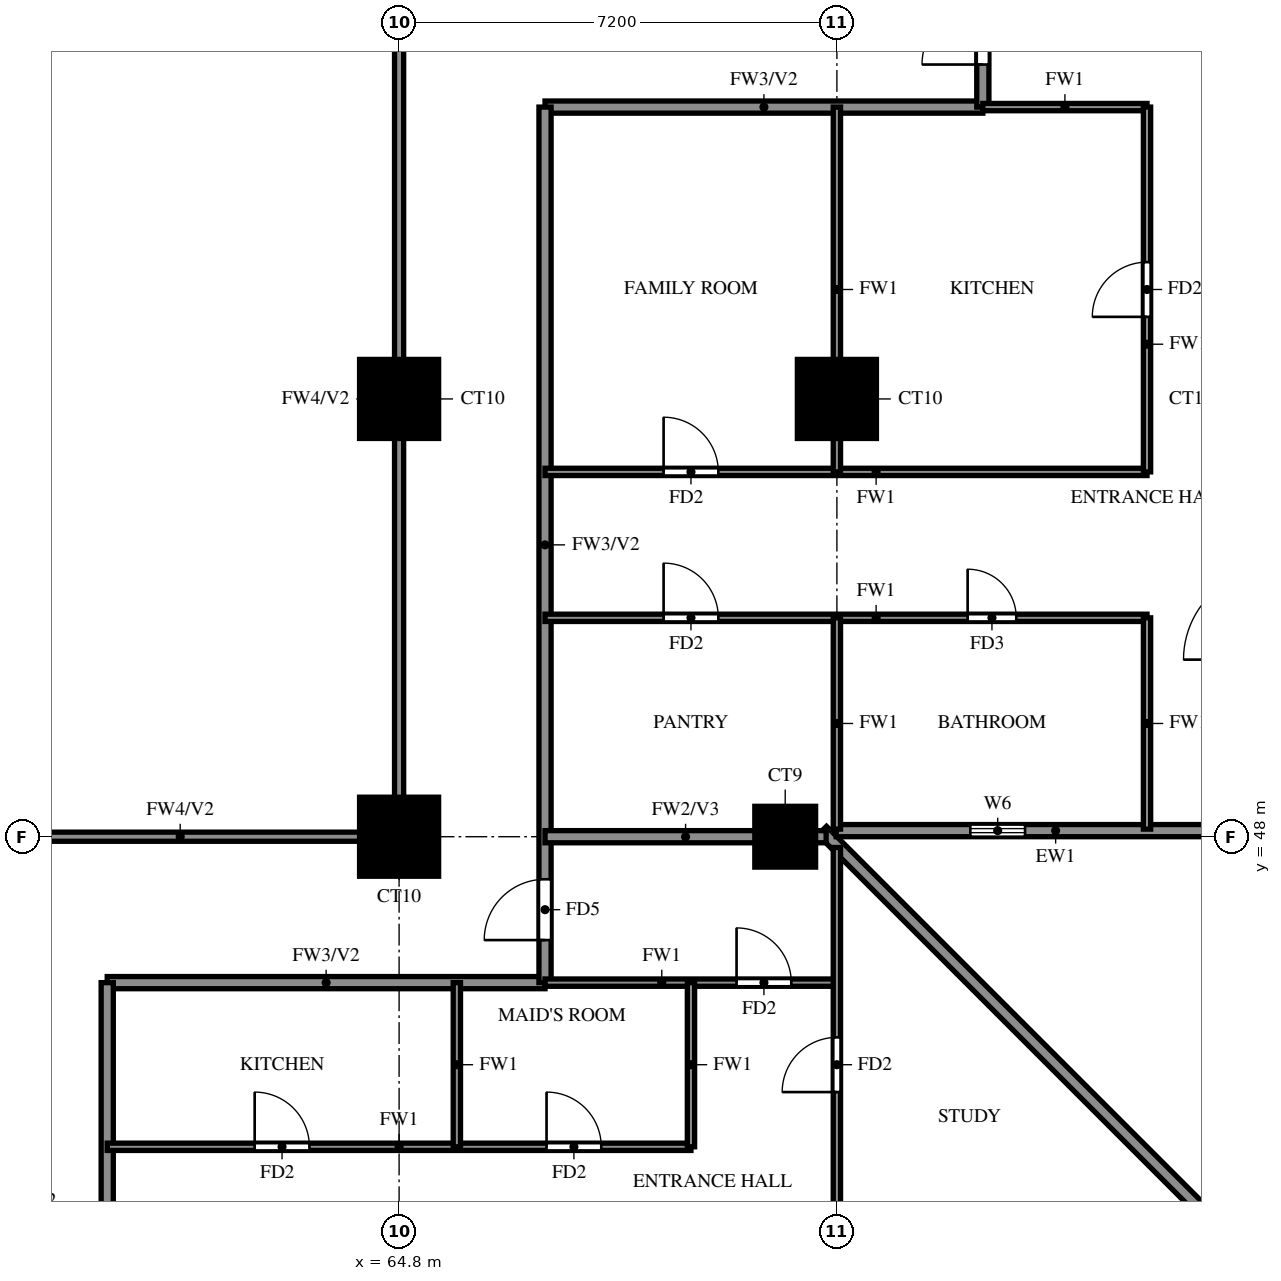
"""IFC4 building model, lengths in metres.
Left out: names, types, materials, properties, quantities, classifications, styles, units other than length and angle.
Written with IfcOpenShell. Run it as: python <this file> out.ifc"""

import sys

from ifc_helpers import new_model, si_unit, direction, frame, frame_2d, origin, origin_2d, place, context, subcontext, project, spatial, rectangle, extrude, source, transform, mapped, element, fill, save


model = new_model("IFC4")
c1 = context("Model", 3, precision=1e-05, world=origin(), true_north=direction((0.0, 1.0)))
c2 = subcontext(c1, "Body", "Model", "MODEL_VIEW")
j1 = project(units=[si_unit("LENGTHUNIT", "METRE"), si_unit("PLANEANGLEUNIT", "RADIAN")], contexts=[c1])
p1 = place(None, origin())
s1 = spatial("IfcSite", under=j1, at=p1, CompositionType="ELEMENT")
p2 = place(p1, origin())
s2 = spatial("IfcBuilding", under=s1, at=p2, CompositionType="ELEMENT")
p3 = place(p2, frame((0.0, 0.0, 72.5)))
s3 = spatial("IfcBuildingStorey", under=s2, at=p3, CompositionType="ELEMENT", Elevation=72.5)
m1 = source(origin(), c2, "Body", "SweptSolid", [
    extrude(rectangle(XDim=1.3, YDim=1.3, at=origin_2d()), origin(), (0.0, 0.0, 1.0), 3.18),
])
p4 = place(p3, frame((64.8, 48.0, 0.0), z_axis=(0.0, 0.0, 1.0), x_axis=(1.0, 0.0, 0.0)))
e1 = element("IfcColumn", 1, at=p4, inside=s3, PredefinedType="COLUMN", context=c2, shape_type="MappedRepresentation", body=[
    mapped(m1, transform((0.0, 0.0, 0.0))),
])
m2 = source(origin(), c2, "Body", "SweptSolid", [
    extrude(rectangle(XDim=1.0, YDim=1.0, at=origin_2d()), origin(), (0.0, 0.0, 1.0), 3.18),
])
p5 = place(p3, frame((71.15, 48.0, 0.0), z_axis=(0.0, 0.0, 1.0), x_axis=(1.0, 0.0, 0.0)))
e2 = element("IfcColumn", 2, at=p5, inside=s3, PredefinedType="COLUMN", context=c2, shape_type="MappedRepresentation", body=[
    mapped(m2, transform((0.0, 0.0, 0.0))),
])
for number, where, z_axis, x_axis in (
    (3, (64.8, 55.2, 0.0), (0.0, 0.0, 1.0), (1.0, 0.0, 0.0)),
    (4, (72.0, 55.2, 0.0), (0.0, 0.0, 1.0), (1.0, 0.0, 0.0)),
):
    element("IfcColumn", number, at=place(p3, frame(where, z_axis=z_axis, x_axis=x_axis)), inside=s3, PredefinedType="COLUMN", context=c2, shape_type="MappedRepresentation", body=[
        mapped(m1, transform((0.0, 0.0, 0.0))),
    ])
p6 = place(p3, frame((85.996, 33.863, 0.0), z_axis=(0.0, 0.0, 1.0), x_axis=(-0.707100718496, 0.707112843825, 0.0)))
e5 = element("IfcWall", 5, at=p6, inside=s3, PredefinedType="SOLIDWALL", context=c2, shape_type="SweptSolid", body=[
    extrude(rectangle(XDim=20.135, YDim=0.2, at=frame_2d((10.067, 0.0))), origin(), (0.0, 0.0, 1.0), 3.18),
])
p7 = place(p3, frame((71.989, 48.1, 0.0), z_axis=(0.0, 0.0, 1.0), x_axis=(1.0, 0.0, 0.0)))
e6 = element("IfcWall", 6, at=p7, inside=s3, PredefinedType="SOLIDWALL", context=c2, shape_type="SweptSolid", body=[
    extrude(rectangle(XDim=6.562, YDim=0.2, at=frame_2d((3.281, 0.0))), origin(), (0.0, 0.0, 1.0), 3.18),
])
p8 = place(p7, frame((2.206, 0.0, 1.5)))
e7 = element("IfcOpeningElement", 7, at=p8, cuts=e6, PredefinedType="OPENING", context=c2, shape_type="SweptSolid", body=[
    extrude(rectangle(XDim=0.9, YDim=0.9, at=frame_2d((0.45, 0.45))), frame((0.0, 0.11, 0.0), z_axis=(0.0, -1.0, 0.0), x_axis=(1.0, 0.0, 0.0)), (0.0, 0.0, 1.0), 0.22),
])
for number, where, z_axis, x_axis in (
    (8, (60.0, 45.6, 0.0), (0.0, 0.0, 1.0), (1.0, 0.0, 0.0)),
    (9, (67.2, 60.0, 0.0), (0.0, 0.0, 1.0), (1.0, 0.0, 0.0)),
):
    element("IfcWall", number, at=place(p3, frame(where, z_axis=z_axis, x_axis=x_axis)), inside=s3, PredefinedType="SOLIDWALL", context=c2, shape_type="SweptSolid", body=[
        extrude(rectangle(XDim=7.2, YDim=0.2, at=frame_2d((3.6, 0.0))), origin(), (0.0, 0.0, 1.0), 3.18),
    ])
p9 = place(p3, frame((60.0, 33.725, 0.0), z_axis=(0.0, 0.0, 1.0), x_axis=(0.0, 1.0, 0.0)))
e10 = element("IfcWall", 10, at=p9, inside=s3, PredefinedType="SOLIDWALL", context=c2, shape_type="SweptSolid", body=[
    extrude(rectangle(XDim=11.875, YDim=0.2, at=frame_2d((5.938, 0.0))), origin(), (0.0, 0.0, 1.0), 2.28),
])
p10 = place(p3, frame((67.2, 45.6, 0.0), z_axis=(0.0, 0.0, 1.0), x_axis=(0.0, 1.0, 0.0)))
e11 = element("IfcWall", 11, at=p10, inside=s3, PredefinedType="SOLIDWALL", context=c2, shape_type="SweptSolid", body=[
    extrude(rectangle(XDim=14.4, YDim=0.2, at=frame_2d((7.2, 0.0))), origin(), (0.0, 0.0, 1.0), 3.18),
])
p11 = place(p10, frame((0.7, 0.0, 0.0)))
e12 = element("IfcOpeningElement", 12, at=p11, cuts=e11, PredefinedType="OPENING", context=c2, shape_type="SweptSolid", body=[
    extrude(rectangle(XDim=1.0, YDim=2.1, at=frame_2d((0.5, 1.05))), frame((0.0, 0.11, 0.0), z_axis=(0.0, -1.0, 0.0), x_axis=(1.0, 0.0, 0.0)), (0.0, 0.0, 1.0), 0.22),
])
p12 = place(p3, frame((74.4, 60.0, 0.0), z_axis=(0.0, 0.0, 1.0), x_axis=(0.0, 1.0, 0.0)))
e13 = element("IfcWall", 13, at=p12, inside=s3, PredefinedType="SOLIDWALL", context=c2, shape_type="SweptSolid", body=[
    extrude(rectangle(XDim=9.45, YDim=0.2, at=frame_2d((4.725, 0.0))), origin(), (0.0, 0.0, 1.0), 3.18),
])
p13 = place(p12, frame((0.7, 0.0, 0.0)))
e14 = element("IfcOpeningElement", 14, at=p13, cuts=e13, PredefinedType="OPENING", context=c2, shape_type="SweptSolid", body=[
    extrude(rectangle(XDim=1.0, YDim=2.1, at=frame_2d((0.5, 1.05))), frame((0.0, 0.11, 0.0), z_axis=(0.0, -1.0, 0.0), x_axis=(1.0, 0.0, 0.0)), (0.0, 0.0, 1.0), 0.22),
])
p14 = place(p12, frame((3.1, 0.0, 0.0)))
e15 = element("IfcOpeningElement", 15, at=p14, cuts=e13, PredefinedType="OPENING", context=c2, shape_type="SweptSolid", body=[
    extrude(rectangle(XDim=1.0, YDim=2.1, at=frame_2d((0.5, 1.05))), frame((0.0, 0.11, 0.0), z_axis=(0.0, -1.0, 0.0), x_axis=(1.0, 0.0, 0.0)), (0.0, 0.0, 1.0), 0.22),
])
p15 = place(p3, frame((67.2, 48.0, 0.0), z_axis=(0.0, 0.0, 1.0), x_axis=(1.0, 0.0, 0.0)))
e16 = element("IfcWall", 16, at=p15, inside=s3, PredefinedType="SOLIDWALL", context=c2, shape_type="SweptSolid", body=[
    extrude(rectangle(XDim=4.623, YDim=0.2, at=frame_2d((2.312, 0.0))), origin(), (0.0, 0.0, 1.0), 3.18),
])
p16 = place(p3, frame((60.0, 42.9, 0.0), z_axis=(0.0, 0.0, 1.0), x_axis=(1.0, 0.0, 0.0)))
e17 = element("IfcWall", 17, at=p16, inside=s3, PredefinedType="PARTITIONING", context=c2, shape_type="SweptSolid", body=[
    extrude(rectangle(XDim=9.6, YDim=0.12, at=frame_2d((4.8, 0.0))), origin(), (0.0, 0.0, 1.0), 3.18),
])
p17 = place(p16, frame((7.225, 0.0, 0.0)))
e18 = element("IfcOpeningElement", 18, at=p17, cuts=e17, PredefinedType="OPENING", context=c2, shape_type="SweptSolid", body=[
    extrude(rectangle(XDim=0.9, YDim=2.1, at=frame_2d((0.45, 1.05))), frame((0.0, 0.07, 0.0), z_axis=(0.0, -1.0, 0.0), x_axis=(1.0, 0.0, 0.0)), (0.0, 0.0, 1.0), 0.14),
])
p18 = place(p16, frame((2.425, 0.0, 0.0)))
e19 = element("IfcOpeningElement", 19, at=p18, cuts=e17, PredefinedType="OPENING", context=c2, shape_type="SweptSolid", body=[
    extrude(rectangle(XDim=0.9, YDim=2.1, at=frame_2d((0.45, 1.05))), frame((0.0, 0.07, 0.0), z_axis=(0.0, -1.0, 0.0), x_axis=(1.0, 0.0, 0.0)), (0.0, 0.0, 1.0), 0.14),
])
p19 = place(p3, frame((67.2, 45.6, 0.0), z_axis=(0.0, 0.0, 1.0), x_axis=(1.0, 0.0, 0.0)))
e20 = element("IfcWall", 20, at=p19, inside=s3, PredefinedType="PARTITIONING", context=c2, shape_type="SweptSolid", body=[
    extrude(rectangle(XDim=4.8, YDim=0.12, at=frame_2d((2.4, 0.0))), origin(), (0.0, 0.0, 1.0), 3.18),
])
p20 = place(p19, frame((3.15, 0.0, 0.0)))
e21 = element("IfcOpeningElement", 21, at=p20, cuts=e20, PredefinedType="OPENING", context=c2, shape_type="SweptSolid", body=[
    extrude(rectangle(XDim=0.9, YDim=2.1, at=frame_2d((0.45, 1.05))), frame((0.0, 0.07, 0.0), z_axis=(0.0, -1.0, 0.0), x_axis=(1.0, 0.0, 0.0)), (0.0, 0.0, 1.0), 0.14),
])
p21 = place(p3, frame((67.2, 51.6, 0.0), z_axis=(0.0, 0.0, 1.0), x_axis=(1.0, 0.0, 0.0)))
e22 = element("IfcWall", 22, at=p21, inside=s3, PredefinedType="PARTITIONING", context=c2, shape_type="SweptSolid", body=[
    extrude(rectangle(XDim=9.9, YDim=0.12, at=frame_2d((4.95, 0.0))), origin(), (0.0, 0.0, 1.0), 3.18),
])
p22 = place(p21, frame((6.95, 0.0, 0.0)))
e23 = element("IfcOpeningElement", 23, at=p22, cuts=e22, PredefinedType="OPENING", context=c2, shape_type="SweptSolid", body=[
    extrude(rectangle(XDim=0.8, YDim=2.1, at=frame_2d((0.4, 1.05))), frame((0.0, 0.07, 0.0), z_axis=(0.0, -1.0, 0.0), x_axis=(1.0, 0.0, 0.0)), (0.0, 0.0, 1.0), 0.14),
])
p23 = place(p21, frame((1.95, 0.0, 0.0)))
e24 = element("IfcOpeningElement", 24, at=p23, cuts=e22, PredefinedType="OPENING", context=c2, shape_type="SweptSolid", body=[
    extrude(rectangle(XDim=0.9, YDim=2.1, at=frame_2d((0.45, 1.05))), frame((0.0, 0.07, 0.0), z_axis=(0.0, -1.0, 0.0), x_axis=(1.0, 0.0, 0.0)), (0.0, 0.0, 1.0), 0.14),
])
p24 = place(p3, frame((67.2, 54.0, 0.0), z_axis=(0.0, 0.0, 1.0), x_axis=(1.0, 0.0, 0.0)))
e25 = element("IfcWall", 25, at=p24, inside=s3, PredefinedType="PARTITIONING", context=c2, shape_type="SweptSolid", body=[
    extrude(rectangle(XDim=9.9, YDim=0.12, at=frame_2d((4.95, 0.0))), origin(), (0.0, 0.0, 1.0), 3.18),
])
p25 = place(p24, frame((1.95, 0.0, 0.0)))
e26 = element("IfcOpeningElement", 26, at=p25, cuts=e25, PredefinedType="OPENING", context=c2, shape_type="SweptSolid", body=[
    extrude(rectangle(XDim=0.9, YDim=2.1, at=frame_2d((0.45, 1.05))), frame((0.0, 0.07, 0.0), z_axis=(0.0, -1.0, 0.0), x_axis=(1.0, 0.0, 0.0)), (0.0, 0.0, 1.0), 0.14),
])
for number, where, z_axis, x_axis in (
    (27, (74.4, 60.0, 0.0), (0.0, 0.0, 1.0), (1.0, 0.0, 0.0)),
    (28, (65.75, 42.9, 0.0), (0.0, 0.0, 1.0), (0.0, 1.0, 0.0)),
    (29, (69.6, 42.9, 0.0), (0.0, 0.0, 1.0), (0.0, 1.0, 0.0)),
):
    element("IfcWall", number, at=place(p3, frame(where, z_axis=z_axis, x_axis=x_axis)), inside=s3, PredefinedType="PARTITIONING", context=c2, shape_type="SweptSolid", body=[
        extrude(rectangle(XDim=2.7, YDim=0.12, at=frame_2d((1.35, 0.0))), origin(), (0.0, 0.0, 1.0), 3.18),
    ])
p26 = place(p3, frame((72.0, 33.725, 0.0), z_axis=(0.0, 0.0, 1.0), x_axis=(0.0, 1.0, 0.0)))
e30 = element("IfcWall", 30, at=p26, inside=s3, PredefinedType="PARTITIONING", context=c2, shape_type="SweptSolid", body=[
    extrude(rectangle(XDim=14.098, YDim=0.12, at=frame_2d((7.049, 0.0))), origin(), (0.0, 0.0, 1.0), 2.28),
])
p27 = place(p26, frame((10.075, 0.0, 0.0)))
e31 = element("IfcOpeningElement", 31, at=p27, cuts=e30, PredefinedType="OPENING", context=c2, shape_type="SweptSolid", body=[
    extrude(rectangle(XDim=0.9, YDim=2.1, at=frame_2d((0.45, 1.05))), frame((0.0, 0.07, 0.0), z_axis=(0.0, -1.0, 0.0), x_axis=(1.0, 0.0, 0.0)), (0.0, 0.0, 1.0), 0.14),
])
p28 = place(p3, frame((72.0, 48.125, 0.0), z_axis=(0.0, 0.0, 1.0), x_axis=(0.0, 1.0, 0.0)))
e32 = element("IfcWall", 32, at=p28, inside=s3, PredefinedType="PARTITIONING", context=c2, shape_type="SweptSolid", body=[
    extrude(rectangle(XDim=3.475, YDim=0.12, at=frame_2d((1.738, 0.0))), origin(), (0.0, 0.0, 1.0), 3.18),
])
p29 = place(p3, frame((72.0, 54.0, 0.0), z_axis=(0.0, 0.0, 1.0), x_axis=(0.0, 1.0, 0.0)))
e33 = element("IfcWall", 33, at=p29, inside=s3, PredefinedType="PARTITIONING", context=c2, shape_type="SweptSolid", body=[
    extrude(rectangle(XDim=6.0, YDim=0.12, at=frame_2d((3.0, 0.0))), origin(), (0.0, 0.0, 1.0), 3.18),
])
p30 = place(p3, frame((77.1, 48.125, 0.0), z_axis=(0.0, 0.0, 1.0), x_axis=(0.0, 1.0, 0.0)))
e34 = element("IfcWall", 34, at=p30, inside=s3, PredefinedType="PARTITIONING", context=c2, shape_type="SweptSolid", body=[
    extrude(rectangle(XDim=3.475, YDim=0.12, at=frame_2d((1.738, 0.0))), origin(), (0.0, 0.0, 1.0), 3.18),
])
p31 = place(p3, frame((77.1, 54.0, 0.0), z_axis=(0.0, 0.0, 1.0), x_axis=(0.0, 1.0, 0.0)))
e35 = element("IfcWall", 35, at=p31, inside=s3, PredefinedType="PARTITIONING", context=c2, shape_type="SweptSolid", body=[
    extrude(rectangle(XDim=6.0, YDim=0.12, at=frame_2d((3.0, 0.0))), origin(), (0.0, 0.0, 1.0), 3.18),
])
p32 = place(p31, frame((2.55, 0.0, 0.0)))
e36 = element("IfcOpeningElement", 36, at=p32, cuts=e35, PredefinedType="OPENING", context=c2, shape_type="SweptSolid", body=[
    extrude(rectangle(XDim=0.9, YDim=2.1, at=frame_2d((0.45, 1.05))), frame((0.0, 0.07, 0.0), z_axis=(0.0, -1.0, 0.0), x_axis=(1.0, 0.0, 0.0)), (0.0, 0.0, 1.0), 0.14),
])
p33 = place(p3, frame((57.6, 48.0, 0.0), z_axis=(0.0, 0.0, 1.0), x_axis=(1.0, 0.0, 0.0)))
e37 = element("IfcWall", 37, at=p33, inside=s3, PredefinedType="SOLIDWALL", context=c2, shape_type="SweptSolid", body=[
    extrude(rectangle(XDim=7.2, YDim=0.15, at=frame_2d((3.6, 0.0))), origin(), (0.0, 0.0, 1.0), 2.28),
])
p34 = place(p3, frame((64.8, 48.0, 0.0), z_axis=(0.0, 0.0, 1.0), x_axis=(0.0, 1.0, 0.0)))
e38 = element("IfcWall", 38, at=p34, inside=s3, PredefinedType="SOLIDWALL", context=c2, shape_type="SweptSolid", body=[
    extrude(rectangle(XDim=14.4, YDim=0.15, at=frame_2d((7.2, 0.0))), origin(), (0.0, 0.0, 1.0), 2.28),
])
p35 = place(p8, origin())
e39 = element("IfcWindow", 39, at=p35, inside=s3, PartitioningType="SINGLE_PANEL", PredefinedType="WINDOW", context=c2, shape_type="SweptSolid", body=[
    extrude(rectangle(XDim=0.9, YDim=0.9, at=frame_2d((0.45, 0.45))), frame((0.0, 0.03, 0.0), z_axis=(0.0, -1.0, 0.0), x_axis=(1.0, 0.0, 0.0)), (0.0, 0.0, 1.0), 0.06),
])
fill(e7, e39)
p36 = place(p13, origin())
e40 = element("IfcDoor", 40, at=p36, inside=s3, OperationType="SINGLE_SWING_LEFT", PredefinedType="DOOR", context=c2, shape_type="SweptSolid", body=[
    extrude(rectangle(XDim=1.0, YDim=2.1, at=frame_2d((0.5, 1.05))), frame((0.0, 0.025, 0.0), z_axis=(0.0, -1.0, 0.0), x_axis=(1.0, 0.0, 0.0)), (0.0, 0.0, 1.0), 0.05),
])
fill(e14, e40)
p37 = place(p22, origin())
e41 = element("IfcDoor", 41, at=p37, inside=s3, OperationType="SINGLE_SWING_RIGHT", PredefinedType="DOOR", context=c2, shape_type="SweptSolid", body=[
    extrude(rectangle(XDim=0.8, YDim=2.1, at=frame_2d((0.4, 1.05))), frame((0.0, 0.025, 0.0), z_axis=(0.0, -1.0, 0.0), x_axis=(1.0, 0.0, 0.0)), (0.0, 0.0, 1.0), 0.05),
])
fill(e23, e41)
p38 = place(p32, origin())
e42 = element("IfcDoor", 42, at=p38, inside=s3, OperationType="SINGLE_SWING_LEFT", PredefinedType="DOOR", context=c2, shape_type="SweptSolid", body=[
    extrude(rectangle(XDim=0.9, YDim=2.1, at=frame_2d((0.45, 1.05))), frame((0.0, 0.025, 0.0), z_axis=(0.0, -1.0, 0.0), x_axis=(1.0, 0.0, 0.0)), (0.0, 0.0, 1.0), 0.05),
])
fill(e36, e42)
p39 = place(p23, origin())
e43 = element("IfcDoor", 43, at=p39, inside=s3, OperationType="SINGLE_SWING_LEFT", PredefinedType="DOOR", context=c2, shape_type="SweptSolid", body=[
    extrude(rectangle(XDim=0.9, YDim=2.1, at=frame_2d((0.45, 1.05))), frame((0.0, 0.025, 0.0), z_axis=(0.0, -1.0, 0.0), x_axis=(1.0, 0.0, 0.0)), (0.0, 0.0, 1.0), 0.05),
])
fill(e24, e43)
p40 = place(p25, origin())
e44 = element("IfcDoor", 44, at=p40, inside=s3, OperationType="SINGLE_SWING_RIGHT", PredefinedType="DOOR", context=c2, shape_type="SweptSolid", body=[
    extrude(rectangle(XDim=0.9, YDim=2.1, at=frame_2d((0.45, 1.05))), frame((0.0, 0.025, 0.0), z_axis=(0.0, -1.0, 0.0), x_axis=(1.0, 0.0, 0.0)), (0.0, 0.0, 1.0), 0.05),
])
fill(e26, e44)
p41 = place(p20, origin())
e45 = element("IfcDoor", 45, at=p41, inside=s3, OperationType="SINGLE_SWING_RIGHT", PredefinedType="DOOR", context=c2, shape_type="SweptSolid", body=[
    extrude(rectangle(XDim=0.9, YDim=2.1, at=frame_2d((0.45, 1.05))), frame((0.0, 0.025, 0.0), z_axis=(0.0, -1.0, 0.0), x_axis=(1.0, 0.0, 0.0)), (0.0, 0.0, 1.0), 0.05),
])
fill(e21, e45)
p42 = place(p11, origin())
e46 = element("IfcDoor", 46, at=p42, inside=s3, OperationType="SINGLE_SWING_LEFT", PredefinedType="DOOR", context=c2, shape_type="SweptSolid", body=[
    extrude(rectangle(XDim=1.0, YDim=2.1, at=frame_2d((0.5, 1.05))), frame((0.0, 0.025, 0.0), z_axis=(0.0, -1.0, 0.0), x_axis=(1.0, 0.0, 0.0)), (0.0, 0.0, 1.0), 0.05),
])
fill(e12, e46)
p43 = place(p17, origin())
e47 = element("IfcDoor", 47, at=p43, inside=s3, OperationType="SINGLE_SWING_LEFT", PredefinedType="DOOR", context=c2, shape_type="SweptSolid", body=[
    extrude(rectangle(XDim=0.9, YDim=2.1, at=frame_2d((0.45, 1.05))), frame((0.0, 0.025, 0.0), z_axis=(0.0, -1.0, 0.0), x_axis=(1.0, 0.0, 0.0)), (0.0, 0.0, 1.0), 0.05),
])
fill(e18, e47)
p44 = place(p18, origin())
e48 = element("IfcDoor", 48, at=p44, inside=s3, OperationType="SINGLE_SWING_RIGHT", PredefinedType="DOOR", context=c2, shape_type="SweptSolid", body=[
    extrude(rectangle(XDim=0.9, YDim=2.1, at=frame_2d((0.45, 1.05))), frame((0.0, 0.025, 0.0), z_axis=(0.0, -1.0, 0.0), x_axis=(1.0, 0.0, 0.0)), (0.0, 0.0, 1.0), 0.05),
])
fill(e19, e48)
p45 = place(p27, origin())
e49 = element("IfcDoor", 49, at=p45, inside=s3, OperationType="SINGLE_SWING_LEFT", PredefinedType="DOOR", context=c2, shape_type="SweptSolid", body=[
    extrude(rectangle(XDim=0.9, YDim=2.1, at=frame_2d((0.45, 1.05))), frame((0.0, 0.025, 0.0), z_axis=(0.0, -1.0, 0.0), x_axis=(1.0, 0.0, 0.0)), (0.0, 0.0, 1.0), 0.05),
])
fill(e31, e49)
save(model, sys.argv[1])
